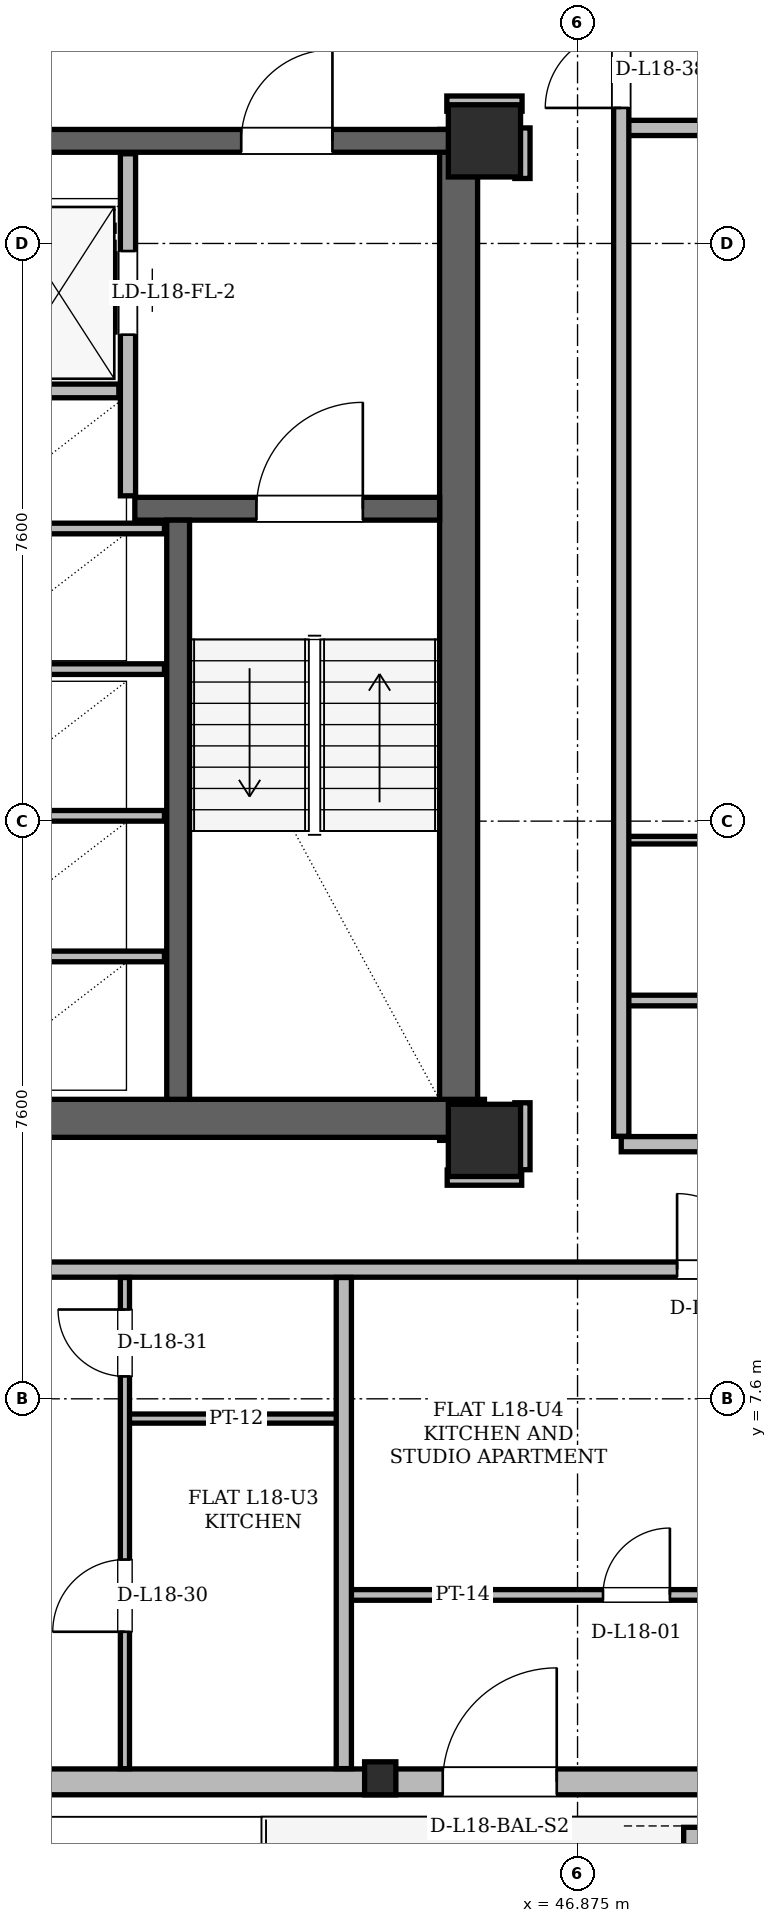
"""IFC4 building model, lengths in metres.
Left out: names, types, materials, properties, quantities, classifications, styles, units other than length and angle.
Written with IfcOpenShell. Run it as: python <this file> out.ifc"""

import sys

from ifc_helpers import new_model, si_unit, direction, frame, frame_2d, origin, origin_2d, place, context, subcontext, project, spatial, polyline, rectangle, hollow_rectangle, i_section, outline, extrude, element, fill, save


model = new_model("IFC4")
c1 = context("Model", 3, precision=1e-05, world=origin(), true_north=direction((0.0, 1.0)))
c2 = subcontext(c1, "Body", "Model", "MODEL_VIEW")
j1 = project(units=[si_unit("LENGTHUNIT", "METRE"), si_unit("PLANEANGLEUNIT", "RADIAN")], contexts=[c1])
p1 = place(None, origin())
s1 = spatial("IfcSite", under=j1, at=p1, CompositionType="ELEMENT")
p2 = place(p1, origin())
s2 = spatial("IfcBuilding", under=s1, at=p2, CompositionType="ELEMENT")
p3 = place(p2, frame((0.0, 0.0, 70.5)))
s3 = spatial("IfcBuildingStorey", under=s2, at=p3, CompositionType="ELEMENT", Elevation=70.5)
for number, where, z_axis, x_axis in (
    (1, (45.65, 11.0, 0.0), (0.0, 0.0, 1.0), (1.0, 0.0, 0.0)),
    (2, (45.65, 24.15, 0.0), (0.0, 0.0, 1.0), (1.0, 0.0, 0.0)),
):
    element("IfcColumn", number, at=place(p3, frame(where, z_axis=z_axis, x_axis=x_axis)), inside=s3, PredefinedType="COLUMN", context=c2, shape_type="SweptSolid", body=[
        extrude(hollow_rectangle(XDim=0.95, YDim=0.95, WallThickness=0.08, at=origin_2d()), origin(), (0.0, 0.0, 1.0), 3.6),
    ])
p4 = place(p3, frame((44.27, 2.561, 0.004), z_axis=(0.004825276439, 0.026097269755, 0.999647762574), x_axis=(-0.983332910059, 0.181814157849, 0.0)))
e3 = element("IfcColumn", 3, at=p4, inside=s3, PredefinedType="COLUMN", context=c2, shape_type="SweptSolid", body=[
    extrude(i_section(OverallWidth=0.411, OverallDepth=0.434, WebThickness=0.036, FlangeThickness=0.057, at=origin_2d()), origin(), (0.0, 0.0, 1.0), 3.592),
])
p5 = place(p3, frame((45.31, 11.0, 0.0), z_axis=(0.0, 0.0, 1.0), x_axis=(0.0, 1.0, 0.0)))
e4 = element("IfcWall", 4, at=p5, inside=s3, PredefinedType="SHEAR", context=c2, shape_type="SweptSolid", body=[
    extrude(rectangle(XDim=13.3, YDim=0.5, at=frame_2d((6.65, 0.0))), origin(), (0.0, 0.0, 1.0), 3.36),
])
p6 = place(p3, frame((38.55, 11.29, 0.0), z_axis=(0.0, 0.0, 1.0), x_axis=(1.0, 0.0, 0.0)))
e5 = element("IfcWall", 5, at=p6, inside=s3, PredefinedType="SHEAR", context=c2, shape_type="SweptSolid", body=[
    extrude(rectangle(XDim=7.1, YDim=0.5, at=frame_2d((3.55, 0.0))), origin(), (0.0, 0.0, 1.0), 3.36),
])
p7 = place(p3, frame((29.65, 24.15, 0.0), z_axis=(0.0, 0.0, 1.0), x_axis=(1.0, 0.0, 0.0)))
e6 = element("IfcWall", 6, at=p7, inside=s3, PredefinedType="SHEAR", context=c2, shape_type="SweptSolid", body=[
    extrude(rectangle(XDim=15.7, YDim=0.3, at=frame_2d((7.85, 0.0))), origin(), (0.0, 0.0, 1.0), 3.36),
])
p8 = place(p7, frame((1.7, 0.0, 0.0)))
e7 = element("IfcOpeningElement", 7, at=p8, cuts=e6, PredefinedType="OPENING", context=c2, shape_type="SweptSolid", body=[
    extrude(rectangle(XDim=1.2, YDim=2.2, at=frame_2d((0.6, 1.1))), frame((0.0, 0.15, 0.0), z_axis=(0.0, -1.0, 0.0), x_axis=(1.0, 0.0, 0.0)), (0.0, 0.0, 1.0), 0.3),
])
p9 = place(p7, frame((12.8, 0.0, 0.0)))
e8 = element("IfcOpeningElement", 8, at=p9, cuts=e6, PredefinedType="OPENING", context=c2, shape_type="SweptSolid", body=[
    extrude(rectangle(XDim=1.2, YDim=2.2, at=frame_2d((0.6, 1.1))), frame((0.0, 0.15, 0.0), z_axis=(0.0, -1.0, 0.0), x_axis=(1.0, 0.0, 0.0)), (0.0, 0.0, 1.0), 0.3),
])
p10 = place(p7, frame((7.4, 0.0, 0.0)))
e9 = element("IfcOpeningElement", 9, at=p10, cuts=e6, PredefinedType="OPENING", context=c2, shape_type="SweptSolid", body=[
    extrude(rectangle(XDim=0.9, YDim=2.05, at=frame_2d((0.45, 1.025))), frame((0.0, 0.15, 0.0), z_axis=(0.0, -1.0, 0.0), x_axis=(1.0, 0.0, 0.0)), (0.0, 0.0, 1.0), 0.3),
])
p11 = place(p3, frame((41.05, 19.31, 0.0), z_axis=(0.0, 0.0, 1.0), x_axis=(1.0, 0.0, 0.0)))
e10 = element("IfcWall", 10, at=p11, inside=s3, PredefinedType="SHEAR", context=c2, shape_type="SweptSolid", body=[
    extrude(rectangle(XDim=4.01, YDim=0.3, at=frame_2d((2.005, 0.0))), origin(), (0.0, 0.0, 1.0), 3.36),
])
p12 = place(p11, frame((1.6, 0.0, 0.0)))
e11 = element("IfcOpeningElement", 11, at=p12, cuts=e10, PredefinedType="OPENING", context=c2, shape_type="SweptSolid", body=[
    extrude(rectangle(XDim=1.4, YDim=2.2, at=frame_2d((0.7, 1.1))), frame((0.0, 0.15, 0.0), z_axis=(0.0, -1.0, 0.0), x_axis=(1.0, 0.0, 0.0)), (0.0, 0.0, 1.0), 0.3),
])
p13 = place(p3, frame((41.62, 11.54, 0.0), z_axis=(0.0, 0.0, 1.0), x_axis=(0.0, 1.0, 0.0)))
e12 = element("IfcWall", 12, at=p13, inside=s3, PredefinedType="SHEAR", context=c2, shape_type="SweptSolid", body=[
    extrude(rectangle(XDim=7.62, YDim=0.3, at=frame_2d((3.81, 0.0))), origin(), (0.0, 0.0, 1.0), 3.36),
])
p14 = place(p3, frame((39.45, 2.561, 0.0), z_axis=(0.0, 0.0, 1.0), x_axis=(1.0, 0.0, 0.0)))
e13 = element("IfcWall", 13, at=p14, inside=s3, PredefinedType="SOLIDWALL", context=c2, shape_type="SweptSolid", body=[
    extrude(rectangle(XDim=14.976, YDim=0.34, at=frame_2d((7.488, 0.0))), origin(), (0.0, 0.0, 1.0), 2.494),
])
p15 = place(p14, frame((5.651, 0.0, 0.0)))
e14 = element("IfcOpeningElement", 14, at=p15, cuts=e13, PredefinedType="OPENING", context=c2, shape_type="SweptSolid", body=[
    extrude(rectangle(XDim=1.5, YDim=2.2, at=frame_2d((0.75, 1.1))), frame((0.0, 0.17, 0.0), z_axis=(0.0, -1.0, 0.0), x_axis=(1.0, 0.0, 0.0)), (0.0, 0.0, 1.0), 0.34),
])
p16 = place(p14, frame((10.301, 0.0, 0.85)))
e15 = element("IfcOpeningElement", 15, at=p16, cuts=e13, PredefinedType="OPENING", context=c2, shape_type="SweptSolid", body=[
    extrude(rectangle(XDim=1.2, YDim=1.48, at=frame_2d((0.6, 0.74))), frame((0.0, 0.17, 0.0), z_axis=(0.0, -1.0, 0.0), x_axis=(1.0, 0.0, 0.0)), (0.0, 0.0, 1.0), 0.34),
])
p17 = place(p14, frame((12.8, 0.0, 0.85)))
e16 = element("IfcOpeningElement", 16, at=p17, cuts=e13, PredefinedType="OPENING", context=c2, shape_type="SweptSolid", body=[
    extrude(rectangle(XDim=1.2, YDim=1.48, at=frame_2d((0.6, 0.74))), frame((0.0, 0.17, 0.0), z_axis=(0.0, -1.0, 0.0), x_axis=(1.0, 0.0, 0.0)), (0.0, 0.0, 1.0), 0.34),
])
p18 = place(p3, frame((48.386, 1.963, 0.0), z_axis=(0.0, 0.0, 1.0), x_axis=(0.0, -1.0, 0.0)))
e17 = element("IfcWall", 17, at=p18, inside=s3, PredefinedType="PARAPET", context=c2, shape_type="SweptSolid", body=[
    extrude(outline(polyline([(0.0, 0.0), (2.042, 0.0), (2.042, 1.1), (0.0, 1.32), (0.0, 0.0)])), frame((0.0, 0.115, 0.0), z_axis=(0.0, -1.0, 0.0), x_axis=(1.0, 0.0, 0.0)), (0.0, 0.0, 1.0), 0.23),
])
p19 = place(p3, frame((40.96, 19.48, 0.0), z_axis=(0.0, 0.0, 1.0), x_axis=(0.0, 1.0, 0.0)))
e18 = element("IfcWall", 18, at=p19, inside=s3, PredefinedType="PARTITIONING", context=c2, shape_type="SweptSolid", body=[
    extrude(rectangle(XDim=4.5, YDim=0.2, at=frame_2d((2.25, 0.0))), origin(), (0.0, 0.0, 1.0), 2.4),
])
p20 = place(p19, frame((2.12, 0.0, 0.0)))
e19 = element("IfcOpeningElement", 19, at=p20, cuts=e18, PredefinedType="OPENING", context=c2, shape_type="SweptSolid", body=[
    extrude(rectangle(XDim=1.1, YDim=2.2, at=frame_2d((0.55, 1.1))), frame((0.0, 0.1, 0.0), z_axis=(0.0, -1.0, 0.0), x_axis=(1.0, 0.0, 0.0)), (0.0, 0.0, 1.0), 0.2),
])
p21 = place(p3, frame((39.26, 20.86, 0.0), z_axis=(0.0, 0.0, 1.0), x_axis=(1.0, 0.0, 0.0)))
e20 = element("IfcWall", 20, at=p21, inside=s3, PredefinedType="PARTITIONING", context=c2, shape_type="SweptSolid", body=[
    extrude(rectangle(XDim=1.58, YDim=0.18, at=frame_2d((0.79, 0.0))), origin(), (0.0, 0.0, 1.0), 3.36),
])
for number, where, z_axis, x_axis in (
    (21, (38.78, 13.42, 0.0), (0.0, 0.0, 1.0), (1.0, 0.0, 0.0)),
    (22, (38.78, 15.27, 0.0), (0.0, 0.0, 1.0), (1.0, 0.0, 0.0)),
    (23, (38.78, 17.2, 0.0), (0.0, 0.0, 1.0), (1.0, 0.0, 0.0)),
    (24, (38.78, 19.05, 0.0), (0.0, 0.0, 1.0), (1.0, 0.0, 0.0)),
):
    element("IfcWall", number, at=place(p3, frame(where, z_axis=z_axis, x_axis=x_axis)), inside=s3, PredefinedType="PARTITIONING", context=c2, shape_type="SweptSolid", body=[
        extrude(rectangle(XDim=2.66, YDim=0.14, at=frame_2d((1.33, 0.0))), origin(), (0.0, 0.0, 1.0), 3.36),
    ])
p22 = place(p3, frame((43.718, 5.02, 0.0), z_axis=(0.0, 0.0, 1.0), x_axis=(1.0, 0.0, 0.0)))
e25 = element("IfcWall", 25, at=p22, inside=s3, PredefinedType="PARTITIONING", context=c2, shape_type="SweptSolid", body=[
    extrude(rectangle(XDim=11.927, YDim=0.14, at=frame_2d((5.963, 0.0))), origin(), (0.0, 0.0, 1.0), 2.738),
])
p23 = place(p22, frame((3.492, 0.0, 0.0)))
e26 = element("IfcOpeningElement", 26, at=p23, cuts=e25, PredefinedType="OPENING", context=c2, shape_type="SweptSolid", body=[
    extrude(rectangle(XDim=0.88, YDim=2.08, at=frame_2d((0.44, 1.04))), frame((0.0, 0.07, 0.0), z_axis=(0.0, -1.0, 0.0), x_axis=(1.0, 0.0, 0.0)), (0.0, 0.0, 1.0), 0.14),
])
p24 = place(p22, frame((9.428, 0.0, 0.0)))
e27 = element("IfcOpeningElement", 27, at=p24, cuts=e25, PredefinedType="OPENING", context=c2, shape_type="SweptSolid", body=[
    extrude(rectangle(XDim=0.88, YDim=2.08, at=frame_2d((0.44, 1.04))), frame((0.0, 0.07, 0.0), z_axis=(0.0, -1.0, 0.0), x_axis=(1.0, 0.0, 0.0)), (0.0, 0.0, 1.0), 0.14),
])
p25 = place(p3, frame((40.92, 7.34, 0.0), z_axis=(0.0, 0.0, 1.0), x_axis=(1.0, 0.0, 0.0)))
e28 = element("IfcWall", 28, at=p25, inside=s3, PredefinedType="PARTITIONING", context=c2, shape_type="SweptSolid", body=[
    extrude(rectangle(XDim=2.93, YDim=0.12, at=frame_2d((1.465, 0.0))), origin(), (0.0, 0.0, 1.0), 2.946),
])
p26 = place(p3, frame((19.2, 9.3, 0.0), z_axis=(0.0, 0.0, 1.0), x_axis=(1.0, 0.0, 0.0)))
e29 = element("IfcWall", 29, at=p26, inside=s3, PredefinedType="PARTITIONING", context=c2, shape_type="SweptSolid", body=[
    extrude(rectangle(XDim=36.6, YDim=0.2, at=frame_2d((18.3, 0.0))), origin(), (0.0, 0.0, 1.0), 2.738),
])
p27 = place(p26, frame((1.633, 0.0, 0.0)))
e30 = element("IfcOpeningElement", 30, at=p27, cuts=e29, PredefinedType="OPENING", context=c2, shape_type="SweptSolid", body=[
    extrude(rectangle(XDim=1.0, YDim=2.18, at=frame_2d((0.5, 1.09))), frame((0.0, 0.1, 0.0), z_axis=(0.0, -1.0, 0.0), x_axis=(1.0, 0.0, 0.0)), (0.0, 0.0, 1.0), 0.2),
])
p28 = place(p26, frame((10.733, 0.0, 0.0)))
e31 = element("IfcOpeningElement", 31, at=p28, cuts=e29, PredefinedType="OPENING", context=c2, shape_type="SweptSolid", body=[
    extrude(rectangle(XDim=1.0, YDim=2.18, at=frame_2d((0.5, 1.09))), frame((0.0, 0.1, 0.0), z_axis=(0.0, -1.0, 0.0), x_axis=(1.0, 0.0, 0.0)), (0.0, 0.0, 1.0), 0.2),
])
p29 = place(p26, frame((19.314, 0.0, 0.0)))
e32 = element("IfcOpeningElement", 32, at=p29, cuts=e29, PredefinedType="OPENING", context=c2, shape_type="SweptSolid", body=[
    extrude(rectangle(XDim=1.0, YDim=2.18, at=frame_2d((0.5, 1.09))), frame((0.0, 0.1, 0.0), z_axis=(0.0, -1.0, 0.0), x_axis=(1.0, 0.0, 0.0)), (0.0, 0.0, 1.0), 0.2),
])
p30 = place(p26, frame((28.985, 0.0, 0.0)))
e33 = element("IfcOpeningElement", 33, at=p30, cuts=e29, PredefinedType="OPENING", context=c2, shape_type="SweptSolid", body=[
    extrude(rectangle(XDim=1.0, YDim=2.18, at=frame_2d((0.5, 1.09))), frame((0.0, 0.1, 0.0), z_axis=(0.0, -1.0, 0.0), x_axis=(1.0, 0.0, 0.0)), (0.0, 0.0, 1.0), 0.2),
])
p31 = place(p26, frame((33.856, 0.0, 0.0)))
e34 = element("IfcOpeningElement", 34, at=p31, cuts=e29, PredefinedType="OPENING", context=c2, shape_type="SweptSolid", body=[
    extrude(rectangle(XDim=1.0, YDim=2.18, at=frame_2d((0.5, 1.09))), frame((0.0, 0.1, 0.0), z_axis=(0.0, -1.0, 0.0), x_axis=(1.0, 0.0, 0.0)), (0.0, 0.0, 1.0), 0.2),
])
p32 = place(p3, frame((45.16, 10.51, 0.0), z_axis=(0.0, 0.0, 1.0), x_axis=(1.0, 0.0, 0.0)))
e35 = element("IfcWall", 35, at=p32, inside=s3, PredefinedType="PARTITIONING", context=c2, shape_type="SweptSolid", body=[
    extrude(rectangle(XDim=0.98, YDim=0.2, at=frame_2d((0.49, 0.0))), origin(), (0.0, 0.0, 1.0), 2.738),
])
p33 = place(p3, frame((47.45, 10.95, 0.0), z_axis=(0.0, 0.0, 1.0), x_axis=(1.0, 0.0, 0.0)))
e36 = element("IfcWall", 36, at=p33, inside=s3, PredefinedType="PARTITIONING", context=c2, shape_type="SweptSolid", body=[
    extrude(rectangle(XDim=11.618, YDim=0.2, at=frame_2d((5.809, 0.0))), origin(), (0.0, 0.0, 1.0), 3.36),
])
p34 = place(p33, frame((5.746, 0.0, 0.0)))
e37 = element("IfcOpeningElement", 37, at=p34, cuts=e36, PredefinedType="OPENING", context=c2, shape_type="SweptSolid", body=[
    extrude(rectangle(XDim=1.0, YDim=2.18, at=frame_2d((0.5, 1.09))), frame((0.0, 0.1, 0.0), z_axis=(0.0, -1.0, 0.0), x_axis=(1.0, 0.0, 0.0)), (0.0, 0.0, 1.0), 0.2),
])
p35 = place(p3, frame((47.4, 12.84, 0.0), z_axis=(0.0, 0.0, 1.0), x_axis=(1.0, 0.0, 0.0)))
e38 = element("IfcWall", 38, at=p35, inside=s3, PredefinedType="PARTITIONING", context=c2, shape_type="SweptSolid", body=[
    extrude(rectangle(XDim=4.38, YDim=0.14, at=frame_2d((2.19, 0.0))), origin(), (0.0, 0.0, 1.0), 3.36),
])
p36 = place(p3, frame((47.4, 14.95, 0.0), z_axis=(0.0, 0.0, 1.0), x_axis=(1.0, 0.0, 0.0)))
e39 = element("IfcWall", 39, at=p36, inside=s3, PredefinedType="PARTITIONING", context=c2, shape_type="SweptSolid", body=[
    extrude(rectangle(XDim=4.38, YDim=0.1, at=frame_2d((2.19, 0.0))), origin(), (0.0, 0.0, 1.0), 2.946),
])
p37 = place(p3, frame((47.45, 24.32, 0.0), z_axis=(0.0, 0.0, 1.0), x_axis=(1.0, 0.0, 0.0)))
e40 = element("IfcWall", 40, at=p37, inside=s3, PredefinedType="PARTITIONING", context=c2, shape_type="SweptSolid", body=[
    extrude(rectangle(XDim=7.666, YDim=0.2, at=frame_2d((3.833, 0.0))), origin(), (0.0, 0.0, 1.0), 2.494),
])
p38 = place(p3, frame((45.155, 24.64, 0.0), z_axis=(0.0, 0.0, 1.0), x_axis=(1.0, 0.0, 0.0)))
e41 = element("IfcWall", 41, at=p38, inside=s3, PredefinedType="PARTITIONING", context=c2, shape_type="SweptSolid", body=[
    extrude(rectangle(XDim=0.99, YDim=0.2, at=frame_2d((0.495, 0.0))), origin(), (0.0, 0.0, 1.0), 2.738),
])
p39 = place(p3, frame((40.92, 2.735, 0.0), z_axis=(0.0, 0.0, 1.0), x_axis=(0.0, 1.0, 0.0)))
e42 = element("IfcWall", 42, at=p39, inside=s3, PredefinedType="PARTITIONING", context=c2, shape_type="SweptSolid", body=[
    extrude(rectangle(XDim=6.461, YDim=0.12, at=frame_2d((3.231, 0.0))), origin(), (0.0, 0.0, 1.0), 3.36),
])
p40 = place(p39, frame((1.801, 0.0, 0.0)))
e43 = element("IfcOpeningElement", 43, at=p40, cuts=e42, PredefinedType="OPENING", context=c2, shape_type="SweptSolid", body=[
    extrude(rectangle(XDim=0.95, YDim=2.1, at=frame_2d((0.475, 1.05))), frame((0.0, 0.06, 0.0), z_axis=(0.0, -1.0, 0.0), x_axis=(1.0, 0.0, 0.0)), (0.0, 0.0, 1.0), 0.12),
])
p41 = place(p39, frame((5.16, 0.0, 0.0)))
e44 = element("IfcOpeningElement", 44, at=p41, cuts=e42, PredefinedType="OPENING", context=c2, shape_type="SweptSolid", body=[
    extrude(rectangle(XDim=0.88, YDim=2.08, at=frame_2d((0.44, 1.04))), frame((0.0, 0.06, 0.0), z_axis=(0.0, -1.0, 0.0), x_axis=(1.0, 0.0, 0.0)), (0.0, 0.0, 1.0), 0.12),
])
p42 = place(p3, frame((43.8, 2.735, 0.0), z_axis=(0.0, 0.0, 1.0), x_axis=(0.0, 1.0, 0.0)))
e45 = element("IfcWall", 45, at=p42, inside=s3, PredefinedType="PARTITIONING", context=c2, shape_type="SweptSolid", body=[
    extrude(rectangle(XDim=6.461, YDim=0.2, at=frame_2d((3.231, 0.0))), origin(), (0.0, 0.0, 1.0), 2.946),
])
p43 = place(p3, frame((46.15, 10.614, 0.0), z_axis=(0.0, 0.0, 1.0), x_axis=(0.0, 1.0, 0.0)))
e46 = element("IfcWall", 46, at=p43, inside=s3, PredefinedType="PARTITIONING", context=c2, shape_type="SweptSolid", body=[
    extrude(rectangle(XDim=0.881, YDim=0.2, at=frame_2d((0.44, 0.0))), origin(), (0.0, 0.0, 1.0), 2.738),
])
p44 = place(p3, frame((46.15, 23.655, 0.0), z_axis=(0.0, 0.0, 1.0), x_axis=(0.0, 1.0, 0.0)))
e47 = element("IfcWall", 47, at=p44, inside=s3, PredefinedType="PARTITIONING", context=c2, shape_type="SweptSolid", body=[
    extrude(rectangle(XDim=0.665, YDim=0.2, at=frame_2d((0.333, 0.0))), origin(), (0.0, 0.0, 1.0), 2.946),
])
p45 = place(p3, frame((47.45, 11.054, 0.0), z_axis=(0.0, 0.0, 1.0), x_axis=(0.0, 1.0, 0.0)))
e48 = element("IfcWall", 48, at=p45, inside=s3, PredefinedType="PARTITIONING", context=c2, shape_type="SweptSolid", body=[
    extrude(rectangle(XDim=14.812, YDim=0.2, at=frame_2d((7.406, 0.0))), origin(), (0.0, 0.0, 1.0), 2.738),
])
p46 = place(p45, frame((13.529, 0.0, 0.0)))
e49 = element("IfcOpeningElement", 49, at=p46, cuts=e48, PredefinedType="OPENING", context=c2, shape_type="SweptSolid", body=[
    extrude(rectangle(XDim=1.0, YDim=2.18, at=frame_2d((0.5, 1.09))), frame((0.0, 0.1, 0.0), z_axis=(0.0, -1.0, 0.0), x_axis=(1.0, 0.0, 0.0)), (0.0, 0.0, 1.0), 0.2),
])
p47 = place(p15, origin())
e50 = element("IfcDoor", 50, at=p47, inside=s3, OperationType="SINGLE_SWING_RIGHT", PredefinedType="DOOR", context=c2, shape_type="SweptSolid", body=[
    extrude(rectangle(XDim=1.5, YDim=2.2, at=frame_2d((0.75, 1.1))), frame((0.0, 0.025, 0.0), z_axis=(0.0, -1.0, 0.0), x_axis=(1.0, 0.0, 0.0)), (0.0, 0.0, 1.0), 0.05),
])
fill(e14, e50)
p48 = place(p20, origin())
e51 = element("IfcDoor", 51, at=p48, inside=s3, OperationType="SLIDING_TO_RIGHT", PredefinedType="DOOR", context=c2, shape_type="SweptSolid", body=[
    extrude(rectangle(XDim=1.1, YDim=2.2, at=frame_2d((0.55, 1.1))), frame((0.0, 0.025, 0.0), z_axis=(0.0, -1.0, 0.0), x_axis=(1.0, 0.0, 0.0)), (0.0, 0.0, 1.0), 0.05),
])
fill(e19, e51)
p49 = place(p12, origin())
e52 = element("IfcDoor", 52, at=p49, inside=s3, OperationType="SINGLE_SWING_RIGHT", PredefinedType="DOOR", context=c2, shape_type="SweptSolid", body=[
    extrude(rectangle(XDim=1.4, YDim=2.2, at=frame_2d((0.7, 1.1))), frame((0.0, 0.025, 0.0), z_axis=(0.0, -1.0, 0.0), x_axis=(1.0, 0.0, 0.0)), (0.0, 0.0, 1.0), 0.05),
])
fill(e11, e52)
p50 = place(p9, origin())
e53 = element("IfcDoor", 53, at=p50, inside=s3, OperationType="SINGLE_SWING_RIGHT", PredefinedType="DOOR", context=c2, shape_type="SweptSolid", body=[
    extrude(rectangle(XDim=1.2, YDim=2.2, at=frame_2d((0.6, 1.1))), frame((0.0, 0.025, 0.0), z_axis=(0.0, -1.0, 0.0), x_axis=(1.0, 0.0, 0.0)), (0.0, 0.0, 1.0), 0.05),
])
fill(e8, e53)
p51 = place(p23, origin())
e54 = element("IfcDoor", 54, at=p51, inside=s3, OperationType="SINGLE_SWING_RIGHT", PredefinedType="DOOR", context=c2, shape_type="SweptSolid", body=[
    extrude(rectangle(XDim=0.88, YDim=2.08, at=frame_2d((0.44, 1.04))), frame((0.0, 0.025, 0.0), z_axis=(0.0, -1.0, 0.0), x_axis=(1.0, 0.0, 0.0)), (0.0, 0.0, 1.0), 0.05),
])
fill(e26, e54)
p52 = place(p30, origin())
e55 = element("IfcDoor", 55, at=p52, inside=s3, OperationType="SINGLE_SWING_LEFT", PredefinedType="DOOR", context=c2, shape_type="SweptSolid", body=[
    extrude(rectangle(XDim=1.0, YDim=2.18, at=frame_2d((0.5, 1.09))), frame((0.0, 0.025, 0.0), z_axis=(0.0, -1.0, 0.0), x_axis=(1.0, 0.0, 0.0)), (0.0, 0.0, 1.0), 0.05),
])
fill(e33, e55)
p53 = place(p40, origin())
e56 = element("IfcDoor", 56, at=p53, inside=s3, OperationType="SINGLE_SWING_LEFT", PredefinedType="DOOR", context=c2, shape_type="SweptSolid", body=[
    extrude(rectangle(XDim=0.95, YDim=2.1, at=frame_2d((0.475, 1.05))), frame((0.0, 0.025, 0.0), z_axis=(0.0, -1.0, 0.0), x_axis=(1.0, 0.0, 0.0)), (0.0, 0.0, 1.0), 0.05),
])
fill(e43, e56)
p54 = place(p41, origin())
e57 = element("IfcDoor", 57, at=p54, inside=s3, OperationType="SINGLE_SWING_RIGHT", PredefinedType="DOOR", context=c2, shape_type="SweptSolid", body=[
    extrude(rectangle(XDim=0.88, YDim=2.08, at=frame_2d((0.44, 1.04))), frame((0.0, 0.025, 0.0), z_axis=(0.0, -1.0, 0.0), x_axis=(1.0, 0.0, 0.0)), (0.0, 0.0, 1.0), 0.05),
])
fill(e44, e57)
p55 = place(p46, origin())
e58 = element("IfcDoor", 58, at=p55, inside=s3, OperationType="SINGLE_SWING_LEFT", PredefinedType="DOOR", context=c2, shape_type="SweptSolid", body=[
    extrude(rectangle(XDim=1.0, YDim=2.18, at=frame_2d((0.5, 1.09))), frame((0.0, 0.025, 0.0), z_axis=(0.0, -1.0, 0.0), x_axis=(1.0, 0.0, 0.0)), (0.0, 0.0, 1.0), 0.05),
])
fill(e49, e58)
save(model, sys.argv[1])
